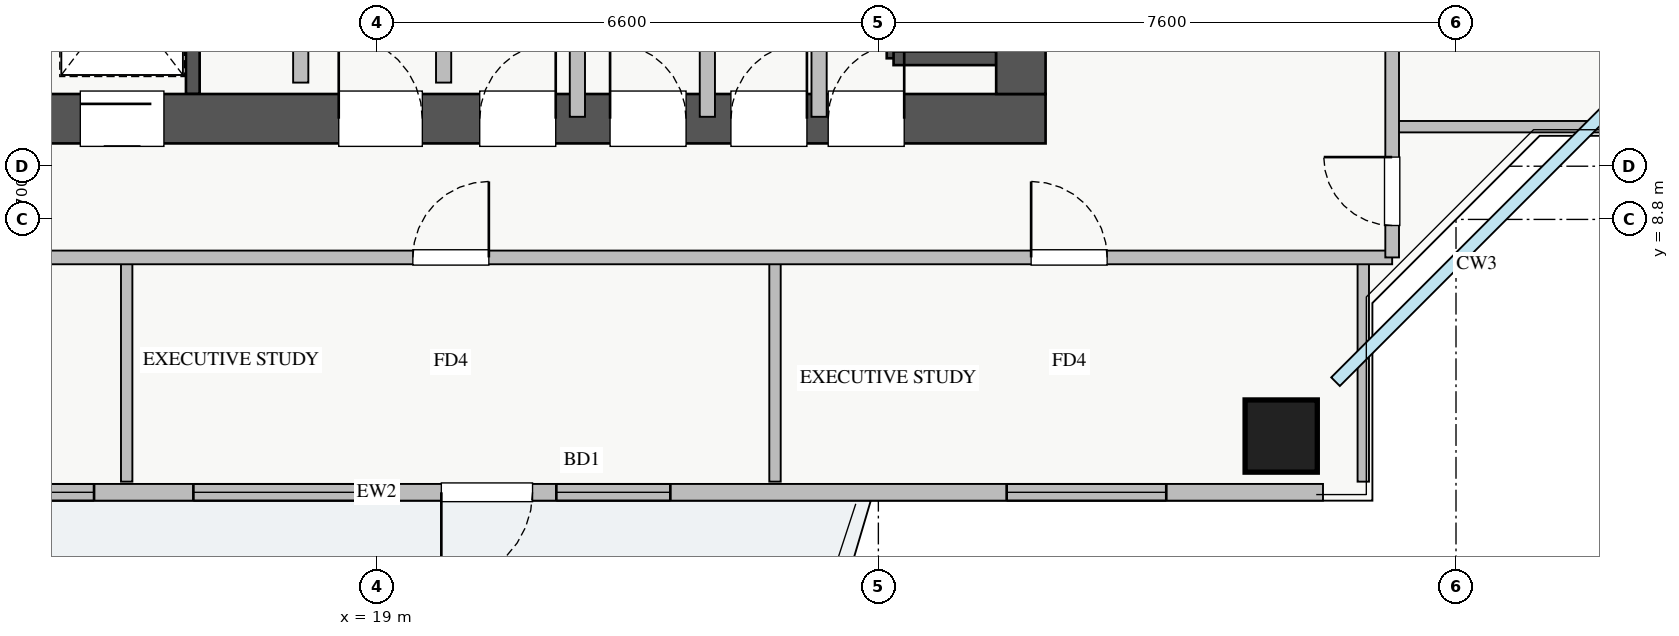
"""IFC4 building model, lengths in metres.
Left out: names, types, materials, properties, quantities, classifications, styles, units other than length and angle.
Written with IfcOpenShell. Run it as: python <this file> out.ifc"""

import sys

from ifc_helpers import new_model, si_unit, direction, frame, frame_2d, origin, origin_2d, place, context, subcontext, project, spatial, rectangle, extrude, source, transform, mapped, element, fill, save


model = new_model("IFC4")
c1 = context("Model", 3, precision=1e-05, world=origin(), true_north=direction((0.0, 1.0)))
c2 = subcontext(c1, "Body", "Model", "MODEL_VIEW")
j1 = project(units=[si_unit("LENGTHUNIT", "METRE"), si_unit("PLANEANGLEUNIT", "RADIAN")], contexts=[c1])
p1 = place(None, origin())
s1 = spatial("IfcSite", under=j1, at=p1, CompositionType="ELEMENT")
p2 = place(p1, origin())
s2 = spatial("IfcBuilding", under=s1, at=p2, CompositionType="ELEMENT")
p3 = place(p2, frame((0.0, 0.0, 143.75)))
s3 = spatial("IfcBuildingStorey", under=s2, at=p3, CompositionType="ELEMENT", Elevation=143.75)
p4 = place(p3, frame((25.8, 10.92, 0.0), z_axis=(0.0, 0.0, 1.0), x_axis=(0.0, 1.0, 0.0)))
e1 = element("IfcWall", 1, at=p4, inside=s3, PredefinedType="SHEAR", context=c2, shape_type="SweptSolid", body=[
    extrude(rectangle(XDim=1.06, YDim=0.18, at=frame_2d((0.53, 0.0))), origin(), (0.0, 0.0, 1.0), 3.07),
])
p5 = place(p3, frame((25.8, 10.92, 0.0), z_axis=(0.0, 0.0, 1.0), x_axis=(1.0, 0.0, 0.0)))
e2 = element("IfcWall", 2, at=p5, inside=s3, PredefinedType="SHEAR", context=c2, shape_type="SweptSolid", body=[
    extrude(rectangle(XDim=1.35, YDim=0.18, at=frame_2d((0.675, 0.0))), origin(), (0.0, 0.0, 1.0), 3.07),
])
p6 = place(p3, frame((16.58, 10.45, 0.0), z_axis=(0.0, 0.0, 1.0), x_axis=(0.0, 1.0, 0.0)))
e3 = element("IfcWall", 3, at=p6, inside=s3, PredefinedType="SHEAR", context=c2, shape_type="SweptSolid", body=[
    extrude(rectangle(XDim=2.35, YDim=0.18, at=frame_2d((1.175, 0.0))), origin(), (0.0, 0.0, 1.0), 3.07),
])
p7 = place(p3, frame((10.2, 10.125, 0.0), z_axis=(0.0, 0.0, 1.0), x_axis=(1.0, 0.0, 0.0)))
e4 = element("IfcWall", 4, at=p7, inside=s3, PredefinedType="SHEAR", context=c2, shape_type="SweptSolid", body=[
    extrude(rectangle(XDim=17.6, YDim=0.65, at=frame_2d((8.8, 0.0))), origin(), (0.0, 0.0, 1.0), 3.25),
])
p8 = place(p7, frame((1.15, 0.0, 0.0)))
e5 = element("IfcOpeningElement", 5, at=p8, cuts=e4, PredefinedType="OPENING", context=c2, shape_type="SweptSolid", body=[
    extrude(rectangle(XDim=1.1, YDim=2.05, at=frame_2d((0.55, 1.025))), frame((0.0, 0.335, 0.0), z_axis=(0.0, -1.0, 0.0), x_axis=(1.0, 0.0, 0.0)), (0.0, 0.0, 1.0), 0.67),
])
p9 = place(p7, frame((8.3, 0.0, 0.0)))
e6 = element("IfcOpeningElement", 6, at=p9, cuts=e4, PredefinedType="OPENING", context=c2, shape_type="SweptSolid", body=[
    extrude(rectangle(XDim=1.1, YDim=2.05, at=frame_2d((0.55, 1.025))), frame((0.0, 0.335, 0.0), z_axis=(0.0, -1.0, 0.0), x_axis=(1.0, 0.0, 0.0)), (0.0, 0.0, 1.0), 0.67),
])
p10 = place(p7, frame((4.9, 0.0, 0.0)))
e7 = element("IfcOpeningElement", 7, at=p10, cuts=e4, PredefinedType="OPENING", context=c2, shape_type="SweptSolid", body=[
    extrude(rectangle(XDim=1.1, YDim=2.05, at=frame_2d((0.55, 1.025))), frame((0.0, 0.335, 0.0), z_axis=(0.0, -1.0, 0.0), x_axis=(1.0, 0.0, 0.0)), (0.0, 0.0, 1.0), 0.67),
])
p11 = place(p7, frame((14.74, 0.0, 0.0)))
e8 = element("IfcOpeningElement", 8, at=p11, cuts=e4, PredefinedType="OPENING", context=c2, shape_type="SweptSolid", body=[
    extrude(rectangle(XDim=1.0, YDim=2.05, at=frame_2d((0.5, 1.025))), frame((0.0, 0.335, 0.0), z_axis=(0.0, -1.0, 0.0), x_axis=(1.0, 0.0, 0.0)), (0.0, 0.0, 1.0), 0.67),
])
p12 = place(p7, frame((10.155, 0.0, 0.0)))
e9 = element("IfcOpeningElement", 9, at=p12, cuts=e4, PredefinedType="OPENING", context=c2, shape_type="SweptSolid", body=[
    extrude(rectangle(XDim=1.0, YDim=2.05, at=frame_2d((0.5, 1.025))), frame((0.0, 0.335, 0.0), z_axis=(0.0, -1.0, 0.0), x_axis=(1.0, 0.0, 0.0)), (0.0, 0.0, 1.0), 0.67),
])
p13 = place(p7, frame((11.87, 0.0, 0.0)))
e10 = element("IfcOpeningElement", 10, at=p13, cuts=e4, PredefinedType="OPENING", context=c2, shape_type="SweptSolid", body=[
    extrude(rectangle(XDim=1.0, YDim=2.05, at=frame_2d((0.5, 1.025))), frame((0.0, 0.335, 0.0), z_axis=(0.0, -1.0, 0.0), x_axis=(1.0, 0.0, 0.0)), (0.0, 0.0, 1.0), 0.67),
])
p14 = place(p7, frame((13.46, 0.0, 0.0)))
e11 = element("IfcOpeningElement", 11, at=p14, cuts=e4, PredefinedType="OPENING", context=c2, shape_type="SweptSolid", body=[
    extrude(rectangle(XDim=1.0, YDim=2.05, at=frame_2d((0.5, 1.025))), frame((0.0, 0.335, 0.0), z_axis=(0.0, -1.0, 0.0), x_axis=(1.0, 0.0, 0.0)), (0.0, 0.0, 1.0), 0.67),
])
p15 = place(p3, frame((27.475, 10.45, 0.0), z_axis=(0.0, 0.0, 1.0), x_axis=(0.0, 1.0, 0.0)))
e12 = element("IfcWall", 12, at=p15, inside=s3, PredefinedType="SHEAR", context=c2, shape_type="SweptSolid", body=[
    extrude(rectangle(XDim=5.9, YDim=0.65, at=frame_2d((2.95, 0.0))), origin(), (0.0, 0.0, 1.0), 3.25),
])
p16 = place(p15, frame((2.1, 0.0, 0.0)))
e13 = element("IfcOpeningElement", 13, at=p16, cuts=e12, PredefinedType="OPENING", context=c2, shape_type="SweptSolid", body=[
    extrude(rectangle(XDim=1.3, YDim=2.05, at=frame_2d((0.65, 1.025))), frame((0.0, 0.335, 0.0), z_axis=(0.0, -1.0, 0.0), x_axis=(1.0, 0.0, 0.0)), (0.0, 0.0, 1.0), 0.67),
])
m1 = source(origin(), c2, "Body", "SweptSolid", [
    extrude(rectangle(XDim=0.95, YDim=0.95, at=origin_2d()), origin(), (0.0, 0.0, 1.0), 3.25),
])
p17 = place(p3, frame((30.9, 5.95, 0.0), z_axis=(0.0, 0.0, 1.0), x_axis=(1.0, 0.0, 0.0)))
e14 = element("IfcColumn", 14, at=p17, inside=s3, PredefinedType="COLUMN", context=c2, shape_type="MappedRepresentation", body=[
    mapped(m1, transform((0.0, 0.0, 0.0), x_axis=(1.0, 0.0, 0.0), y_axis=(0.0, 1.0, 0.0), z_axis=(0.0, 0.0, 1.0), scale=1.0)),
])
p18 = place(p3, frame((6.55, 5.21, 0.0), z_axis=(0.0, 0.0, 1.0), x_axis=(1.0, 0.0, 0.0)))
e15 = element("IfcWall", 15, at=p18, inside=s3, PredefinedType="STANDARD", context=c2, shape_type="SweptSolid", body=[
    extrude(rectangle(XDim=24.9, YDim=0.22, at=frame_2d((12.45, 0.0))), origin(), (0.0, 0.0, 1.0), 2.61),
])
p19 = place(p18, frame((13.3, 0.0, 0.0)))
e16 = element("IfcOpeningElement", 16, at=p19, cuts=e15, PredefinedType="OPENING", context=c2, shape_type="SweptSolid", body=[
    extrude(rectangle(XDim=1.2, YDim=2.1, at=frame_2d((0.6, 1.05))), frame((0.0, 0.12, 0.0), z_axis=(0.0, -1.0, 0.0), x_axis=(1.0, 0.0, 0.0)), (0.0, 0.0, 1.0), 0.24),
])
p20 = place(p18, frame((0.357, 0.0, 0.9)))
e17 = element("IfcOpeningElement", 17, at=p20, cuts=e15, PredefinedType="OPENING", context=c2, shape_type="SweptSolid", body=[
    extrude(rectangle(XDim=1.5, YDim=1.5, at=frame_2d((0.75, 0.75))), frame((0.0, 0.12, 0.0), z_axis=(0.0, -1.0, 0.0), x_axis=(1.0, 0.0, 0.0)), (0.0, 0.0, 1.0), 0.24),
])
p21 = place(p18, frame((6.931, 0.0, 0.9)))
e18 = element("IfcOpeningElement", 18, at=p21, cuts=e15, PredefinedType="OPENING", context=c2, shape_type="SweptSolid", body=[
    extrude(rectangle(XDim=1.8, YDim=1.5, at=frame_2d((0.9, 0.75))), frame((0.0, 0.12, 0.0), z_axis=(0.0, -1.0, 0.0), x_axis=(1.0, 0.0, 0.0)), (0.0, 0.0, 1.0), 0.24),
])
p22 = place(p18, frame((14.813, 0.0, 0.9)))
e19 = element("IfcOpeningElement", 19, at=p22, cuts=e15, PredefinedType="OPENING", context=c2, shape_type="SweptSolid", body=[
    extrude(rectangle(XDim=1.5, YDim=1.45, at=frame_2d((0.75, 0.725))), frame((0.0, 0.12, 0.0), z_axis=(0.0, -1.0, 0.0), x_axis=(1.0, 0.0, 0.0)), (0.0, 0.0, 1.0), 0.24),
])
p23 = place(p18, frame((20.738, 0.0, 0.9)))
e20 = element("IfcOpeningElement", 20, at=p23, cuts=e15, PredefinedType="OPENING", context=c2, shape_type="SweptSolid", body=[
    extrude(rectangle(XDim=2.1, YDim=1.48, at=frame_2d((1.05, 0.74))), frame((0.0, 0.12, 0.0), z_axis=(0.0, -1.0, 0.0), x_axis=(1.0, 0.0, 0.0)), (0.0, 0.0, 1.0), 0.24),
])
p24 = place(p18, frame((4.136, 0.0, 0.9)))
e21 = element("IfcOpeningElement", 21, at=p24, cuts=e15, PredefinedType="OPENING", context=c2, shape_type="SweptSolid", body=[
    extrude(rectangle(XDim=2.4, YDim=1.5, at=frame_2d((1.2, 0.75))), frame((0.0, 0.12, 0.0), z_axis=(0.0, -1.0, 0.0), x_axis=(1.0, 0.0, 0.0)), (0.0, 0.0, 1.0), 0.24),
])
p25 = place(p18, frame((10.038, 0.0, 0.9)))
e22 = element("IfcOpeningElement", 22, at=p25, cuts=e15, PredefinedType="OPENING", context=c2, shape_type="SweptSolid", body=[
    extrude(rectangle(XDim=2.4, YDim=1.5, at=frame_2d((1.2, 0.75))), frame((0.0, 0.12, 0.0), z_axis=(0.0, -1.0, 0.0), x_axis=(1.0, 0.0, 0.0)), (0.0, 0.0, 1.0), 0.24),
])
for number, where, z_axis, x_axis in (
    (23, (18.0, 10.6, 0.0), (0.0, 0.0, 1.0), (0.0, 1.0, 0.0)),
    (24, (19.88, 10.6, 0.0), (0.0, 0.0, 1.0), (0.0, 1.0, 0.0)),
):
    element("IfcWall", number, at=place(p3, frame(where, z_axis=z_axis, x_axis=x_axis)), inside=s3, PredefinedType="PARTITIONING", context=c2, shape_type="SweptSolid", body=[
        extrude(rectangle(XDim=2.21, YDim=0.2, at=frame_2d((1.105, 0.0))), origin(), (0.0, 0.0, 1.0), 3.07),
    ])
for number, where, z_axis, x_axis in (
    (25, (24.82, 10.15, 0.0), (0.0, 0.0, 1.0), (0.0, 1.0, 0.0)),
    (26, (21.64, 10.15, 0.0), (0.0, 0.0, 1.0), (0.0, 1.0, 0.0)),
    (27, (23.35, 10.15, 0.0), (0.0, 0.0, 1.0), (0.0, 1.0, 0.0)),
):
    element("IfcWall", number, at=place(p3, frame(where, z_axis=z_axis, x_axis=x_axis)), inside=s3, PredefinedType="PARTITIONING", context=c2, shape_type="SweptSolid", body=[
        extrude(rectangle(XDim=2.65, YDim=0.2, at=frame_2d((1.325, 0.0))), origin(), (0.0, 0.0, 1.0), 3.07),
    ])
p26 = place(p3, frame((15.71, 5.35, 0.0), z_axis=(0.0, 0.0, 1.0), x_axis=(0.0, 1.0, 0.0)))
e28 = element("IfcWall", 28, at=p26, inside=s3, PredefinedType="PARTITIONING", context=c2, shape_type="SweptSolid", body=[
    extrude(rectangle(XDim=2.95, YDim=0.15, at=frame_2d((1.475, 0.0))), origin(), (0.0, 0.0, 1.0), 2.865),
])
for number, where, z_axis, x_axis in (
    (29, (24.24, 5.35, 0.0), (0.0, 0.0, 1.0), (0.0, 1.0, 0.0)),
    (30, (31.98, 5.35, 0.0), (0.0, 0.0, 1.0), (0.0, 1.0, 0.0)),
):
    element("IfcWall", number, at=place(p3, frame(where, z_axis=z_axis, x_axis=x_axis)), inside=s3, PredefinedType="PARTITIONING", context=c2, shape_type="SweptSolid", body=[
        extrude(rectangle(XDim=2.95, YDim=0.15, at=frame_2d((1.475, 0.0))), origin(), (0.0, 0.0, 1.0), 3.07),
    ])
p27 = place(p3, frame((8.75, 8.3, 0.0), z_axis=(0.0, 0.0, 1.0), x_axis=(1.0, 0.0, 0.0)))
e31 = element("IfcWall", 31, at=p27, inside=s3, PredefinedType="PARTITIONING", context=c2, shape_type="SweptSolid", body=[
    extrude(rectangle(XDim=23.61, YDim=0.18, at=frame_2d((11.805, 0.0))), origin(), (0.0, 0.0, 1.0), 3.07),
])
p28 = place(p27, frame((2.98, 0.0, 0.0)))
e32 = element("IfcOpeningElement", 32, at=p28, cuts=e31, PredefinedType="OPENING", context=c2, shape_type="SweptSolid", body=[
    extrude(rectangle(XDim=1.0, YDim=2.05, at=frame_2d((0.5, 1.025))), frame((0.0, 0.1, 0.0), z_axis=(0.0, -1.0, 0.0), x_axis=(1.0, 0.0, 0.0)), (0.0, 0.0, 1.0), 0.2),
])
p29 = place(p27, frame((10.725, 0.0, 0.0)))
e33 = element("IfcOpeningElement", 33, at=p29, cuts=e31, PredefinedType="OPENING", context=c2, shape_type="SweptSolid", body=[
    extrude(rectangle(XDim=1.0, YDim=2.05, at=frame_2d((0.5, 1.025))), frame((0.0, 0.1, 0.0), z_axis=(0.0, -1.0, 0.0), x_axis=(1.0, 0.0, 0.0)), (0.0, 0.0, 1.0), 0.2),
])
p30 = place(p27, frame((18.86, 0.0, 0.0)))
e34 = element("IfcOpeningElement", 34, at=p30, cuts=e31, PredefinedType="OPENING", context=c2, shape_type="SweptSolid", body=[
    extrude(rectangle(XDim=1.0, YDim=2.05, at=frame_2d((0.5, 1.025))), frame((0.0, 0.1, 0.0), z_axis=(0.0, -1.0, 0.0), x_axis=(1.0, 0.0, 0.0)), (0.0, 0.0, 1.0), 0.2),
])
p31 = place(p3, frame((32.36, 10.02, 0.0), z_axis=(0.0, 0.0, 1.0), x_axis=(1.0, 0.0, 0.0)))
e35 = element("IfcWall", 35, at=p31, inside=s3, PredefinedType="PARTITIONING", context=c2, shape_type="SweptSolid", body=[
    extrude(rectangle(XDim=4.29, YDim=0.15, at=frame_2d((2.145, 0.0))), origin(), (0.0, 0.0, 1.0), 3.07),
])
p32 = place(p3, frame((32.36, 8.3, 0.0), z_axis=(0.0, 0.0, 1.0), x_axis=(0.0, 1.0, 0.0)))
e36 = element("IfcWall", 36, at=p32, inside=s3, PredefinedType="PARTITIONING", context=c2, shape_type="SweptSolid", body=[
    extrude(rectangle(XDim=29.4, YDim=0.18, at=frame_2d((14.7, 0.0))), origin(), (0.0, 0.0, 1.0), 3.07),
])
p33 = place(p32, frame((28.08, 0.0, 0.0)))
e37 = element("IfcOpeningElement", 37, at=p33, cuts=e36, PredefinedType="OPENING", context=c2, shape_type="SweptSolid", body=[
    extrude(rectangle(XDim=0.9, YDim=2.05, at=frame_2d((0.45, 1.025))), frame((0.0, 0.1, 0.0), z_axis=(0.0, -1.0, 0.0), x_axis=(1.0, 0.0, 0.0)), (0.0, 0.0, 1.0), 0.2),
])
p34 = place(p32, frame((0.42, 0.0, 0.0)))
e38 = element("IfcOpeningElement", 38, at=p34, cuts=e36, PredefinedType="OPENING", context=c2, shape_type="SweptSolid", body=[
    extrude(rectangle(XDim=0.9, YDim=2.05, at=frame_2d((0.45, 1.025))), frame((0.0, 0.1, 0.0), z_axis=(0.0, -1.0, 0.0), x_axis=(1.0, 0.0, 0.0)), (0.0, 0.0, 1.0), 0.2),
])
p35 = place(p32, frame((8.05, 0.0, 0.0)))
e39 = element("IfcOpeningElement", 39, at=p35, cuts=e36, PredefinedType="OPENING", context=c2, shape_type="SweptSolid", body=[
    extrude(rectangle(XDim=1.0, YDim=2.05, at=frame_2d((0.5, 1.025))), frame((0.0, 0.1, 0.0), z_axis=(0.0, -1.0, 0.0), x_axis=(1.0, 0.0, 0.0)), (0.0, 0.0, 1.0), 0.2),
])
p36 = place(p32, frame((18.01, 0.0, 0.0)))
e40 = element("IfcOpeningElement", 40, at=p36, cuts=e36, PredefinedType="OPENING", context=c2, shape_type="SweptSolid", body=[
    extrude(rectangle(XDim=1.0, YDim=2.05, at=frame_2d((0.5, 1.025))), frame((0.0, 0.1, 0.0), z_axis=(0.0, -1.0, 0.0), x_axis=(1.0, 0.0, 0.0)), (0.0, 0.0, 1.0), 0.2),
])
m2 = source(origin(), c2, "Body", "SweptSolid", [
    extrude(rectangle(XDim=1.2, YDim=2.1, at=frame_2d((0.6, 1.05))), frame((0.0, 0.025, 0.0), z_axis=(0.0, -1.0, 0.0), x_axis=(1.0, 0.0, 0.0)), (0.0, 0.0, 1.0), 0.05),
])
p37 = place(p19, frame((1.2, 0.0, 0.0), z_axis=(0.0, 0.0, 1.0), x_axis=(-1.0, 0.0, 0.0)))
e41 = element("IfcDoor", 41, at=p37, inside=s3, OperationType="SINGLE_SWING_LEFT", PredefinedType="DOOR", context=c2, shape_type="MappedRepresentation", body=[
    mapped(m2, transform((0.0, 0.0, 0.0), x_axis=(1.0, 0.0, 0.0), y_axis=(0.0, 1.0, 0.0), z_axis=(0.0, 0.0, 1.0), scale=1.0)),
])
fill(e16, e41)
m3 = source(origin(), c2, "Body", "SweptSolid", [
    extrude(rectangle(XDim=1.8, YDim=1.5, at=frame_2d((0.9, 0.75))), frame((0.0, 0.03, 0.0), z_axis=(0.0, -1.0, 0.0), x_axis=(1.0, 0.0, 0.0)), (0.0, 0.0, 1.0), 0.06),
])
p38 = place(p21, origin())
e42 = element("IfcWindow", 42, at=p38, inside=s3, PartitioningType="DOUBLE_PANEL_VERTICAL", PredefinedType="WINDOW", context=c2, shape_type="MappedRepresentation", body=[
    mapped(m3, transform((0.0, 0.0, 0.0), x_axis=(1.0, 0.0, 0.0), y_axis=(0.0, 1.0, 0.0), z_axis=(0.0, 0.0, 1.0), scale=1.0)),
])
fill(e18, e42)
m4 = source(origin(), c2, "Body", "SweptSolid", [
    extrude(rectangle(XDim=1.5, YDim=1.45, at=frame_2d((0.75, 0.725))), frame((0.0, 0.03, 0.0), z_axis=(0.0, -1.0, 0.0), x_axis=(1.0, 0.0, 0.0)), (0.0, 0.0, 1.0), 0.06),
])
p39 = place(p22, origin())
e43 = element("IfcWindow", 43, at=p39, inside=s3, PartitioningType="DOUBLE_PANEL_VERTICAL", PredefinedType="WINDOW", context=c2, shape_type="MappedRepresentation", body=[
    mapped(m4, transform((0.0, 0.0, 0.0), x_axis=(1.0, 0.0, 0.0), y_axis=(0.0, 1.0, 0.0), z_axis=(0.0, 0.0, 1.0), scale=1.0)),
])
fill(e19, e43)
m5 = source(origin(), c2, "Body", "SweptSolid", [
    extrude(rectangle(XDim=2.1, YDim=1.48, at=frame_2d((1.05, 0.74))), frame((0.0, 0.03, 0.0), z_axis=(0.0, -1.0, 0.0), x_axis=(1.0, 0.0, 0.0)), (0.0, 0.0, 1.0), 0.06),
])
p40 = place(p23, origin())
e44 = element("IfcWindow", 44, at=p40, inside=s3, PartitioningType="TRIPLE_PANEL_VERTICAL", PredefinedType="WINDOW", context=c2, shape_type="MappedRepresentation", body=[
    mapped(m5, transform((0.0, 0.0, 0.0), x_axis=(1.0, 0.0, 0.0), y_axis=(0.0, 1.0, 0.0), z_axis=(0.0, 0.0, 1.0), scale=1.0)),
])
fill(e20, e44)
m6 = source(origin(), c2, "Body", "SweptSolid", [
    extrude(rectangle(XDim=1.1, YDim=2.05, at=frame_2d((0.55, 1.025))), frame((0.0, 0.025, 0.0), z_axis=(0.0, -1.0, 0.0), x_axis=(1.0, 0.0, 0.0)), (0.0, 0.0, 1.0), 0.05),
])
p41 = place(p9, origin())
e45 = element("IfcDoor", 45, at=p41, inside=s3, OperationType="SINGLE_SWING_LEFT", PredefinedType="DOOR", context=c2, shape_type="MappedRepresentation", body=[
    mapped(m6, transform((0.0, 0.0, 0.0), x_axis=(1.0, 0.0, 0.0), y_axis=(0.0, 1.0, 0.0), z_axis=(0.0, 0.0, 1.0), scale=1.0)),
])
fill(e6, e45)
p42 = place(p10, origin())
e46 = element("IfcDoor", 46, at=p42, inside=s3, OperationType="SLIDING_TO_RIGHT", PredefinedType="DOOR", context=c2, shape_type="MappedRepresentation", body=[
    mapped(m6, transform((0.0, 0.0, 0.0), x_axis=(1.0, 0.0, 0.0), y_axis=(0.0, 1.0, 0.0), z_axis=(0.0, 0.0, 1.0), scale=1.0)),
])
fill(e7, e46)
m7 = source(origin(), c2, "Body", "SweptSolid", [
    extrude(rectangle(XDim=1.0, YDim=2.05, at=frame_2d((0.5, 1.025))), frame((0.0, 0.025, 0.0), z_axis=(0.0, -1.0, 0.0), x_axis=(1.0, 0.0, 0.0)), (0.0, 0.0, 1.0), 0.05),
])
p43 = place(p11, origin())
e47 = element("IfcDoor", 47, at=p43, inside=s3, OperationType="SINGLE_SWING_RIGHT", PredefinedType="DOOR", context=c2, shape_type="MappedRepresentation", body=[
    mapped(m7, transform((0.0, 0.0, 0.0), x_axis=(1.0, 0.0, 0.0), y_axis=(0.0, 1.0, 0.0), z_axis=(0.0, 0.0, 1.0), scale=1.0)),
])
fill(e8, e47)
p44 = place(p12, origin())
e48 = element("IfcDoor", 48, at=p44, inside=s3, OperationType="SINGLE_SWING_RIGHT", PredefinedType="DOOR", context=c2, shape_type="MappedRepresentation", body=[
    mapped(m7, transform((0.0, 0.0, 0.0), x_axis=(1.0, 0.0, 0.0), y_axis=(0.0, 1.0, 0.0), z_axis=(0.0, 0.0, 1.0), scale=1.0)),
])
fill(e9, e48)
p45 = place(p13, origin())
e49 = element("IfcDoor", 49, at=p45, inside=s3, OperationType="SINGLE_SWING_LEFT", PredefinedType="DOOR", context=c2, shape_type="MappedRepresentation", body=[
    mapped(m7, transform((0.0, 0.0, 0.0), x_axis=(1.0, 0.0, 0.0), y_axis=(0.0, 1.0, 0.0), z_axis=(0.0, 0.0, 1.0), scale=1.0)),
])
fill(e10, e49)
p46 = place(p14, origin())
e50 = element("IfcDoor", 50, at=p46, inside=s3, OperationType="SINGLE_SWING_RIGHT", PredefinedType="DOOR", context=c2, shape_type="MappedRepresentation", body=[
    mapped(m7, transform((0.0, 0.0, 0.0), x_axis=(1.0, 0.0, 0.0), y_axis=(0.0, 1.0, 0.0), z_axis=(0.0, 0.0, 1.0), scale=1.0)),
])
fill(e11, e50)
p47 = place(p29, origin())
e51 = element("IfcDoor", 51, at=p47, inside=s3, OperationType="SINGLE_SWING_RIGHT", PredefinedType="DOOR", context=c2, shape_type="MappedRepresentation", body=[
    mapped(m7, transform((0.0, 0.0, 0.0), x_axis=(1.0, 0.0, 0.0), y_axis=(0.0, 1.0, 0.0), z_axis=(0.0, 0.0, 1.0), scale=1.0)),
])
fill(e33, e51)
p48 = place(p30, origin())
e52 = element("IfcDoor", 52, at=p48, inside=s3, OperationType="SINGLE_SWING_LEFT", PredefinedType="DOOR", context=c2, shape_type="MappedRepresentation", body=[
    mapped(m7, transform((0.0, 0.0, 0.0), x_axis=(1.0, 0.0, 0.0), y_axis=(0.0, 1.0, 0.0), z_axis=(0.0, 0.0, 1.0), scale=1.0)),
])
fill(e34, e52)
m8 = source(origin(), c2, "Body", "SweptSolid", [
    extrude(rectangle(XDim=0.9, YDim=2.05, at=frame_2d((0.45, 1.025))), frame((0.0, 0.025, 0.0), z_axis=(0.0, -1.0, 0.0), x_axis=(1.0, 0.0, 0.0)), (0.0, 0.0, 1.0), 0.05),
])
p49 = place(p34, origin())
e53 = element("IfcDoor", 53, at=p49, inside=s3, OperationType="SINGLE_SWING_RIGHT", PredefinedType="DOOR", context=c2, shape_type="MappedRepresentation", body=[
    mapped(m8, transform((0.0, 0.0, 0.0), x_axis=(1.0, 0.0, 0.0), y_axis=(0.0, 1.0, 0.0), z_axis=(0.0, 0.0, 1.0), scale=1.0)),
])
fill(e38, e53)
m9 = source(origin(), c2, "Body", "SweptSolid", [
    extrude(rectangle(XDim=2.4, YDim=1.5, at=frame_2d((1.2, 0.75))), frame((0.0, 0.03, 0.0), z_axis=(0.0, -1.0, 0.0), x_axis=(1.0, 0.0, 0.0)), (0.0, 0.0, 1.0), 0.06),
])
p50 = place(p25, origin())
e54 = element("IfcWindow", 54, at=p50, inside=s3, PartitioningType="TRIPLE_PANEL_VERTICAL", PredefinedType="WINDOW", context=c2, shape_type="MappedRepresentation", body=[
    mapped(m9, transform((0.0, 0.0, 0.0), x_axis=(1.0, 0.0, 0.0), y_axis=(0.0, 1.0, 0.0), z_axis=(0.0, 0.0, 1.0), scale=1.0)),
])
fill(e22, e54)
save(model, sys.argv[1])
